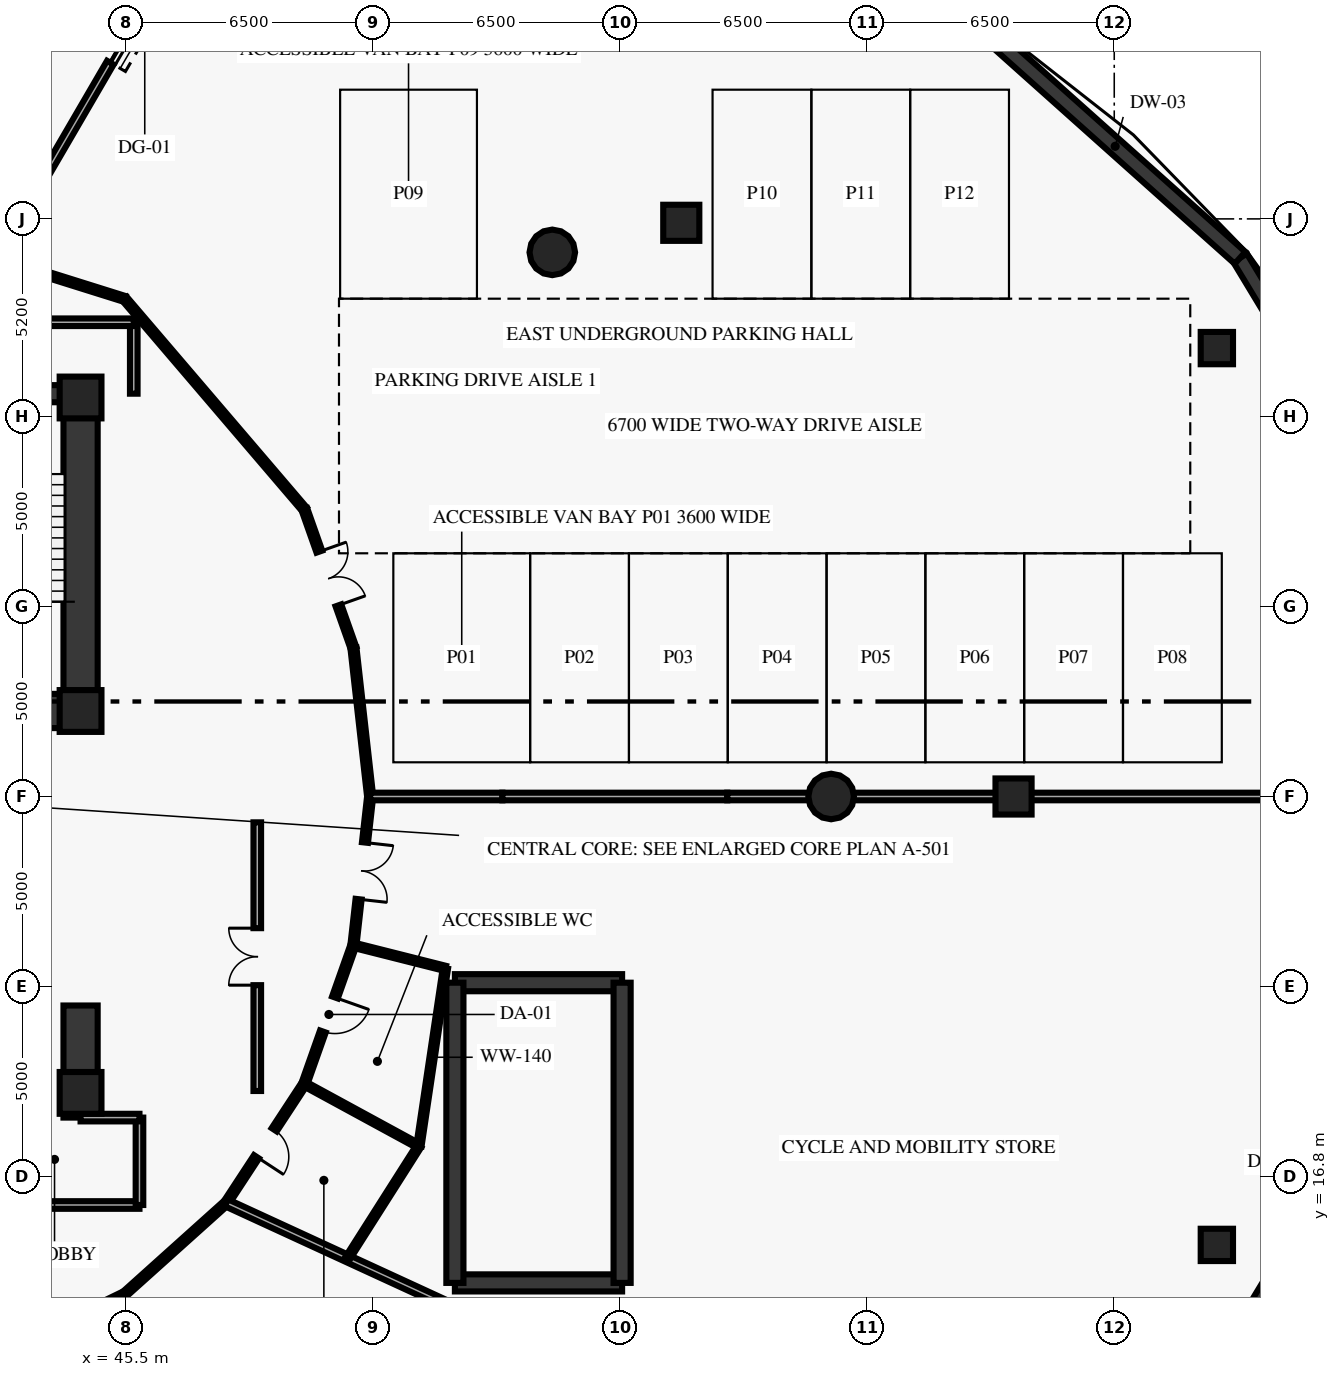
"""IFC4 building model, lengths in metres.
Left out: names, types, materials, properties, quantities, classifications, styles, units other than length and angle.
Written with IfcOpenShell. Run it as: python <this file> out.ifc"""

import sys

from ifc_helpers import new_model, si_unit, direction, frame, frame_2d, origin, origin_2d, place, context, subcontext, project, spatial, rectangle, circle, extrude, element, fill, save


model = new_model("IFC4")
c1 = context("Model", 3, precision=1e-05, world=origin(), true_north=direction((0.0, 1.0)))
c2 = subcontext(c1, "Body", "Model", "MODEL_VIEW")
j1 = project(units=[si_unit("LENGTHUNIT", "METRE"), si_unit("PLANEANGLEUNIT", "RADIAN")], contexts=[c1])
p1 = place(None, origin())
s1 = spatial("IfcSite", under=j1, at=p1, CompositionType="ELEMENT")
p2 = place(p1, origin())
s2 = spatial("IfcBuilding", under=s1, at=p2, CompositionType="ELEMENT")
p3 = place(p2, frame((0.0, 0.0, -9.0)))
s3 = spatial("IfcBuildingStorey", under=s2, at=p3, CompositionType="ELEMENT", Elevation=-9.0)
for number, where, z_axis, x_axis in (
    (1, (44.3, 19.0, 0.0), (0.0, 0.0, 1.0), (1.0, 0.0, 0.0)),
    (2, (44.3, 29.05, 0.0), (0.0, 0.0, 1.0), (1.0, 0.0, 0.0)),
    (3, (44.3, 37.3, 0.0), (0.0, 0.0, 1.0), (1.0, 0.0, 0.0)),
):
    element("IfcColumn", number, at=place(p3, frame(where, z_axis=z_axis, x_axis=x_axis)), inside=s3, PredefinedType="PILASTER", context=c2, shape_type="SweptSolid", body=[
        extrude(rectangle(XDim=1.1, YDim=1.1, at=origin_2d()), origin(), (0.0, 0.0, 1.0), 4.2),
    ])
for number, where, z_axis, x_axis in (
    (4, (64.05, 26.8, 0.0), (0.0, 0.0, 1.0), (1.0, 0.0, 0.0)),
    (5, (56.713, 41.119, 0.0), (0.0, 0.0, 1.0), (1.0, 0.0, 0.0)),
):
    element("IfcColumn", number, at=place(p3, frame(where, z_axis=z_axis, x_axis=x_axis)), inside=s3, PredefinedType="COLUMN", context=c2, shape_type="SweptSolid", body=[
        extrude(circle(Radius=0.6, at=origin_2d()), origin(), (0.0, 0.0, 1.0), 4.2),
    ])
for number, where, z_axis, x_axis in (
    (6, (68.85, 26.8, 0.0), (0.0, 0.0, 1.0), (1.0, 0.0, 0.0)),
    (7, (60.107, 41.897, 0.0), (0.0, 0.0, 1.0), (1.0, 0.0, 0.0)),
):
    element("IfcColumn", number, at=place(p3, frame(where, z_axis=z_axis, x_axis=x_axis)), inside=s3, PredefinedType="COLUMN", context=c2, shape_type="SweptSolid", body=[
        extrude(rectangle(XDim=0.95, YDim=0.95, at=origin_2d()), origin(), (0.0, 0.0, 1.0), 4.2),
    ])
for number, where, z_axis, x_axis in (
    (8, (74.2, 15.0, 0.0), (0.0, 0.0, 1.0), (1.0, 0.0, 0.0)),
    (9, (74.2, 38.6, 0.0), (0.0, 0.0, 1.0), (1.0, 0.0, 0.0)),
):
    element("IfcColumn", number, at=place(p3, frame(where, z_axis=z_axis, x_axis=x_axis)), inside=s3, PredefinedType="COLUMN", context=c2, shape_type="SweptSolid", body=[
        extrude(rectangle(XDim=0.85, YDim=0.85, at=origin_2d()), origin(), (0.0, 0.0, 1.0), 4.2),
    ])
p4 = place(p3, frame((44.3, 29.05, 0.0), z_axis=(0.0, 0.0, 1.0), x_axis=(0.0, 1.0, 0.0)))
e10 = element("IfcWall", 10, at=p4, inside=s3, PredefinedType="SHEAR", context=c2, shape_type="SweptSolid", body=[
    extrude(rectangle(XDim=8.35, YDim=0.9, at=frame_2d((4.175, 0.0))), origin(), (0.0, 0.0, 1.0), 4.2),
])
p5 = place(p3, frame((44.3, 18.35, 0.0), z_axis=(0.0, 0.0, 1.0), x_axis=(0.0, 1.0, 0.0)))
e11 = element("IfcWall", 11, at=p5, inside=s3, PredefinedType="SHEAR", context=c2, shape_type="SweptSolid", body=[
    extrude(rectangle(XDim=2.95, YDim=0.9, at=frame_2d((1.475, 0.0))), origin(), (0.0, 0.0, 1.0), 4.2),
])
p6 = place(p3, frame((33.7, 29.05, 0.0), z_axis=(0.0, 0.0, 1.0), x_axis=(1.0, 0.0, 0.0)))
e12 = element("IfcWall", 12, at=p6, inside=s3, PredefinedType="SHEAR", context=c2, shape_type="SweptSolid", body=[
    extrude(rectangle(XDim=10.6, YDim=0.9, at=frame_2d((5.3, 0.0))), origin(), (0.0, 0.0, 1.0), 4.2),
])
p7 = place(p3, frame((78.941, 34.138, 0.0), z_axis=(0.0, 0.0, 1.0), x_axis=(-0.517122636798, 0.85591131463, 0.0)))
e13 = element("IfcWall", 13, at=p7, inside=s3, PredefinedType="SHEAR", context=c2, shape_type="SweptSolid", body=[
    extrude(rectangle(XDim=7.988, YDim=0.42, at=frame_2d((3.994, 0.0))), origin(), (0.0, 0.0, 1.0), 4.2),
])
p8 = place(p3, frame((74.81, 40.975, 0.0), z_axis=(0.0, 0.0, 1.0), x_axis=(-0.745720826992, 0.666258544554, 0.0)))
e14 = element("IfcWall", 14, at=p8, inside=s3, PredefinedType="SHEAR", context=c2, shape_type="SweptSolid", body=[
    extrude(rectangle(XDim=8.812, YDim=0.42, at=frame_2d((4.406, 0.0))), origin(), (0.0, 0.0, 1.0), 4.2),
])
p9 = place(p3, frame((74.81, 12.625, 0.0), z_axis=(0.0, 0.0, 1.0), x_axis=(0.517136164524, 0.855903141332, 0.0)))
e15 = element("IfcWall", 15, at=p9, inside=s3, PredefinedType="SHEAR", context=c2, shape_type="SweptSolid", body=[
    extrude(rectangle(XDim=7.988, YDim=0.42, at=frame_2d((3.994, 0.0))), origin(), (0.0, 0.0, 1.0), 4.2),
])
p10 = place(p3, frame((44.3, 37.4, 0.0), z_axis=(0.0, 0.0, 1.0), x_axis=(-1.0, 0.0, 0.0)))
e16 = element("IfcWall", 16, at=p10, inside=s3, PredefinedType="SHEAR", context=c2, shape_type="SweptSolid", body=[
    extrude(rectangle(XDim=3.65, YDim=0.45, at=frame_2d((1.825, 0.0))), origin(), (0.0, 0.0, 1.0), 4.2),
])
p11 = place(p10, frame((1.25, 0.0, 0.0)))
e17 = element("IfcOpeningElement", 17, at=p11, cuts=e16, PredefinedType="OPENING", context=c2, shape_type="SweptSolid", body=[
    extrude(rectangle(XDim=1.15, YDim=2.15, at=frame_2d((0.575, 1.075))), frame((0.0, 0.235, 0.0), z_axis=(0.0, -1.0, 0.0), x_axis=(1.0, 0.0, 0.0)), (0.0, 0.0, 1.0), 0.47),
])
for number, where, z_axis, x_axis in (
    (18, (54.15, 14.0, 0.0), (0.0, 0.0, 1.0), (1.0, 0.0, 0.0)),
    (19, (54.15, 21.9, 0.0), (0.0, 0.0, 1.0), (1.0, 0.0, 0.0)),
):
    element("IfcWall", number, at=place(p3, frame(where, z_axis=z_axis, x_axis=x_axis)), inside=s3, PredefinedType="SHEAR", context=c2, shape_type="SweptSolid", body=[
        extrude(rectangle(XDim=4.4, YDim=0.45, at=frame_2d((2.2, 0.0))), origin(), (0.0, 0.0, 1.0), 4.2),
    ])
for number, where, z_axis, x_axis in (
    (20, (54.15, 14.0, 0.0), (0.0, 0.0, 1.0), (0.0, 1.0, 0.0)),
    (21, (58.55, 14.0, 0.0), (0.0, 0.0, 1.0), (0.0, 1.0, 0.0)),
):
    element("IfcWall", number, at=place(p3, frame(where, z_axis=z_axis, x_axis=x_axis)), inside=s3, PredefinedType="SHEAR", context=c2, shape_type="SweptSolid", body=[
        extrude(rectangle(XDim=7.9, YDim=0.45, at=frame_2d((3.95, 0.0))), origin(), (0.0, 0.0, 1.0), 4.2),
    ])
p12 = place(p3, frame((45.7, 37.4, 0.0), z_axis=(0.0, 0.0, 1.0), x_axis=(0.0, 1.0, 0.0)))
e22 = element("IfcWall", 22, at=p12, inside=s3, PredefinedType="SOLIDWALL", context=c2, shape_type="SweptSolid", body=[
    extrude(rectangle(XDim=1.88, YDim=0.2, at=frame_2d((0.94, 0.0))), origin(), (0.0, 0.0, 1.0), 4.2),
])
p13 = place(p3, frame((45.7, 39.28, 0.0), z_axis=(0.0, 0.0, 1.0), x_axis=(-1.0, 0.0, 0.0)))
e23 = element("IfcWall", 23, at=p13, inside=s3, PredefinedType="SOLIDWALL", context=c2, shape_type="SweptSolid", body=[
    extrude(rectangle(XDim=6.6, YDim=0.2, at=frame_2d((3.3, 0.0))), origin(), (0.0, 0.0, 1.0), 4.2),
])
p14 = place(p13, frame((4.35, 0.0, 0.0)))
e24 = element("IfcOpeningElement", 24, at=p14, cuts=e23, PredefinedType="OPENING", context=c2, shape_type="SweptSolid", body=[
    extrude(rectangle(XDim=1.6, YDim=2.2, at=frame_2d((0.8, 1.1))), frame((0.0, 0.11, 0.0), z_axis=(0.0, -1.0, 0.0), x_axis=(1.0, 0.0, 0.0)), (0.0, 0.0, 1.0), 0.22),
])
p15 = place(p3, frame((48.95, 19.05, 0.0), z_axis=(0.0, 0.0, 1.0), x_axis=(0.0, 1.0, 0.0)))
e25 = element("IfcWall", 25, at=p15, inside=s3, PredefinedType="SOLIDWALL", context=c2, shape_type="SweptSolid", body=[
    extrude(rectangle(XDim=7.07, YDim=0.2, at=frame_2d((3.535, 0.0))), origin(), (0.0, 0.0, 1.0), 4.2),
])
p16 = place(p15, frame((2.785, 0.0, 0.0)))
e26 = element("IfcOpeningElement", 26, at=p16, cuts=e25, PredefinedType="OPENING", context=c2, shape_type="SweptSolid", body=[
    extrude(rectangle(XDim=1.5, YDim=2.2, at=frame_2d((0.75, 1.1))), frame((0.0, 0.11, 0.0), z_axis=(0.0, -1.0, 0.0), x_axis=(1.0, 0.0, 0.0)), (0.0, 0.0, 1.0), 0.22),
])
p17 = place(p3, frame((41.35, 16.05, 0.0), z_axis=(0.0, 0.0, 1.0), x_axis=(1.0, 0.0, 0.0)))
e27 = element("IfcWall", 27, at=p17, inside=s3, PredefinedType="SOLIDWALL", context=c2, shape_type="SweptSolid", body=[
    extrude(rectangle(XDim=4.5, YDim=0.2, at=frame_2d((2.25, 0.0))), origin(), (0.0, 0.0, 1.0), 4.2),
])
p18 = place(p3, frame((45.85, 16.05, 0.0), z_axis=(0.0, 0.0, 1.0), x_axis=(0.0, 1.0, 0.0)))
e28 = element("IfcWall", 28, at=p18, inside=s3, PredefinedType="SOLIDWALL", context=c2, shape_type="SweptSolid", body=[
    extrude(rectangle(XDim=2.3, YDim=0.2, at=frame_2d((1.15, 0.0))), origin(), (0.0, 0.0, 1.0), 4.2),
])
p19 = place(p3, frame((44.3, 18.35, 0.0), z_axis=(0.0, 0.0, 1.0), x_axis=(1.0, 0.0, 0.0)))
e29 = element("IfcWall", 29, at=p19, inside=s3, PredefinedType="SOLIDWALL", context=c2, shape_type="SweptSolid", body=[
    extrude(rectangle(XDim=1.55, YDim=0.2, at=frame_2d((0.775, 0.0))), origin(), (0.0, 0.0, 1.0), 4.2),
])
p20 = place(p3, frame((51.92, 26.8, 0.0), z_axis=(0.0, 0.0, 1.0), x_axis=(-0.111731247657, 0.993738460711, 0.0)))
e30 = element("IfcWall", 30, at=p20, inside=s3, PredefinedType="PARTITIONING", context=c2, shape_type="SweptSolid", body=[
    extrude(rectangle(XDim=3.938, YDim=0.16, at=frame_2d((1.969, 0.0))), origin(), (0.0, 0.0, 1.0), 4.2),
])
p21 = place(p3, frame((50.189, 34.36, 0.0), z_axis=(0.0, 0.0, 1.0), x_axis=(0.333684770033, -0.942684716248, 0.0)))
e31 = element("IfcWall", 31, at=p21, inside=s3, PredefinedType="PARTITIONING", context=c2, shape_type="SweptSolid", body=[
    extrude(rectangle(XDim=3.869, YDim=0.16, at=frame_2d((1.935, 0.0))), origin(), (0.0, 0.0, 1.0), 4.2),
])
p22 = place(p21, frame((1.184, 0.0, 0.0)))
e32 = element("IfcOpeningElement", 32, at=p22, cuts=e31, PredefinedType="OPENING", context=c2, shape_type="SweptSolid", body=[
    extrude(rectangle(XDim=1.5, YDim=2.2, at=frame_2d((0.75, 1.1))), frame((0.0, 0.09, 0.0), z_axis=(0.0, -1.0, 0.0), x_axis=(1.0, 0.0, 0.0)), (0.0, 0.0, 1.0), 0.18),
])
p23 = place(p3, frame((50.189, 34.36, 0.0), z_axis=(0.0, 0.0, 1.0), x_axis=(-0.649652680018, 0.760231145998, 0.0)))
e33 = element("IfcWall", 33, at=p23, inside=s3, PredefinedType="PARTITIONING", context=c2, shape_type="SweptSolid", body=[
    extrude(rectangle(XDim=7.279, YDim=0.16, at=frame_2d((3.64, 0.0))), origin(), (0.0, 0.0, 1.0), 4.2),
])
p24 = place(p3, frame((45.46, 39.894, 0.0), z_axis=(0.0, 0.0, 1.0), x_axis=(-0.95417919824, 0.29923578938, 0.0)))
e34 = element("IfcWall", 34, at=p24, inside=s3, PredefinedType="PARTITIONING", context=c2, shape_type="SweptSolid", body=[
    extrude(rectangle(XDim=6.77, YDim=0.16, at=frame_2d((3.385, 0.0))), origin(), (0.0, 0.0, 1.0), 4.2),
])
p25 = place(p3, frame((45.46, 13.706, 0.0), z_axis=(0.0, 0.0, 1.0), x_axis=(-0.899789784655, -0.436323668199, 0.0)))
e35 = element("IfcWall", 35, at=p25, inside=s3, PredefinedType="PARTITIONING", context=c2, shape_type="SweptSolid", body=[
    extrude(rectangle(XDim=3.463, YDim=0.16, at=frame_2d((1.731, 0.0))), origin(), (0.0, 0.0, 1.0), 4.2),
])
p26 = place(p25, frame((0.982, 0.0, 0.0)))
e36 = element("IfcOpeningElement", 36, at=p26, cuts=e35, PredefinedType="OPENING", context=c2, shape_type="SweptSolid", body=[
    extrude(rectangle(XDim=1.5, YDim=2.2, at=frame_2d((0.75, 1.1))), frame((0.0, 0.09, 0.0), z_axis=(0.0, -1.0, 0.0), x_axis=(1.0, 0.0, 0.0)), (0.0, 0.0, 1.0), 0.18),
])
p27 = place(p3, frame((45.46, 13.706, 0.0), z_axis=(0.0, 0.0, 1.0), x_axis=(0.744066617248, 0.668105432621, 0.0)))
e37 = element("IfcWall", 37, at=p27, inside=s3, PredefinedType="PARTITIONING", context=c2, shape_type="SweptSolid", body=[
    extrude(rectangle(XDim=3.596, YDim=0.16, at=frame_2d((1.798, 0.0))), origin(), (0.0, 0.0, 1.0), 4.2),
])
p28 = place(p3, frame((50.189, 19.24, 0.0), z_axis=(0.0, 0.0, 1.0), x_axis=(-0.548318837904, -0.836269365694, 0.0)))
e38 = element("IfcWall", 38, at=p28, inside=s3, PredefinedType="PARTITIONING", context=c2, shape_type="SweptSolid", body=[
    extrude(rectangle(XDim=3.744, YDim=0.16, at=frame_2d((1.872, 0.0))), origin(), (0.0, 0.0, 1.0), 4.2),
])
p29 = place(p28, frame((1.447, 0.0, 0.0)))
e39 = element("IfcOpeningElement", 39, at=p29, cuts=e38, PredefinedType="OPENING", context=c2, shape_type="SweptSolid", body=[
    extrude(rectangle(XDim=0.85, YDim=2.1, at=frame_2d((0.425, 1.05))), frame((0.0, 0.09, 0.0), z_axis=(0.0, -1.0, 0.0), x_axis=(1.0, 0.0, 0.0)), (0.0, 0.0, 1.0), 0.18),
])
p30 = place(p3, frame((51.48, 22.887, 0.0), z_axis=(0.0, 0.0, 1.0), x_axis=(-0.333704620558, -0.942677689467, 0.0)))
e40 = element("IfcWall", 40, at=p30, inside=s3, PredefinedType="PARTITIONING", context=c2, shape_type="SweptSolid", body=[
    extrude(rectangle(XDim=3.869, YDim=0.16, at=frame_2d((1.934, 0.0))), origin(), (0.0, 0.0, 1.0), 4.2),
])
p31 = place(p30, frame((1.459, 0.0, 0.0)))
e41 = element("IfcOpeningElement", 41, at=p31, cuts=e40, PredefinedType="OPENING", context=c2, shape_type="SweptSolid", body=[
    extrude(rectangle(XDim=0.95, YDim=2.1, at=frame_2d((0.475, 1.05))), frame((0.0, 0.09, 0.0), z_axis=(0.0, -1.0, 0.0), x_axis=(1.0, 0.0, 0.0)), (0.0, 0.0, 1.0), 0.18),
])
p32 = place(p3, frame((51.92, 26.8, 0.0), z_axis=(0.0, 0.0, 1.0), x_axis=(-0.111724363671, -0.99373923469, 0.0)))
e42 = element("IfcWall", 42, at=p32, inside=s3, PredefinedType="PARTITIONING", context=c2, shape_type="SweptSolid", body=[
    extrude(rectangle(XDim=3.938, YDim=0.16, at=frame_2d((1.969, 0.0))), origin(), (0.0, 0.0, 1.0), 4.2),
])
p33 = place(p32, frame((1.219, 0.0, 0.0)))
e43 = element("IfcOpeningElement", 43, at=p33, cuts=e42, PredefinedType="OPENING", context=c2, shape_type="SweptSolid", body=[
    extrude(rectangle(XDim=1.5, YDim=2.2, at=frame_2d((0.75, 1.1))), frame((0.0, 0.09, 0.0), z_axis=(0.0, -1.0, 0.0), x_axis=(1.0, 0.0, 0.0)), (0.0, 0.0, 1.0), 0.18),
])
p34 = place(p3, frame((51.92, 26.8, 0.0), z_axis=(0.0, 0.0, 1.0), x_axis=(1.0, 0.0, 0.0)))
e44 = element("IfcWall", 44, at=p34, inside=s3, PredefinedType="SOLIDWALL", context=c2, shape_type="SweptSolid", body=[
    extrude(rectangle(XDim=3.48, YDim=0.2, at=frame_2d((1.74, 0.0))), origin(), (0.0, 0.0, 1.0), 4.2),
])
p35 = place(p3, frame((55.4, 26.8, 0.0), z_axis=(0.0, 0.0, 1.0), x_axis=(1.0, 0.0, 0.0)))
e45 = element("IfcWall", 45, at=p35, inside=s3, PredefinedType="SOLIDWALL", context=c2, shape_type="SweptSolid", body=[
    extrude(rectangle(XDim=5.917, YDim=0.2, at=frame_2d((2.958, 0.0))), origin(), (0.0, 0.0, 1.0), 4.2),
])
p36 = place(p3, frame((61.317, 26.8, 0.0), z_axis=(0.0, 0.0, 1.0), x_axis=(1.0, 0.0, 0.0)))
e46 = element("IfcWall", 46, at=p36, inside=s3, PredefinedType="SOLIDWALL", context=c2, shape_type="SweptSolid", body=[
    extrude(rectangle(XDim=7.533, YDim=0.2, at=frame_2d((3.767, 0.0))), origin(), (0.0, 0.0, 1.0), 3.16),
])
p37 = place(p3, frame((68.85, 26.8, 0.0), z_axis=(0.0, 0.0, 1.0), x_axis=(1.0, 0.0, 0.0)))
e47 = element("IfcWall", 47, at=p37, inside=s3, PredefinedType="SOLIDWALL", context=c2, shape_type="SweptSolid", body=[
    extrude(rectangle(XDim=11.235, YDim=0.2, at=frame_2d((5.617, 0.0))), origin(), (0.0, 0.0, 1.0), 4.2),
])
p38 = place(p3, frame((42.344, 41.405, 0.0), z_axis=(0.0, 0.0, 1.0), x_axis=(0.503097710949, 0.864229537355, 0.0)))
e48 = element("IfcWall", 48, at=p38, inside=s3, PredefinedType="SOLIDWALL", context=c2, shape_type="SweptSolid", body=[
    extrude(rectangle(XDim=14.49, YDim=0.2, at=frame_2d((7.245, 0.0))), origin(), (0.0, 0.0, 1.0), 4.2),
])
p39 = place(p38, frame((5.445, 0.0, 0.0)))
e49 = element("IfcOpeningElement", 49, at=p39, cuts=e48, PredefinedType="OPENING", context=c2, shape_type="SweptSolid", body=[
    extrude(rectangle(XDim=3.6, YDim=2.4, at=frame_2d((1.8, 1.2))), frame((0.0, 0.11, 0.0), z_axis=(0.0, -1.0, 0.0), x_axis=(1.0, 0.0, 0.0)), (0.0, 0.0, 1.0), 0.22),
])
p40 = place(p3, frame((48.136, 16.109, 0.0), z_axis=(0.0, 0.0, 1.0), x_axis=(0.908368089602, -0.418171512411, 0.0)))
e50 = element("IfcWall", 50, at=p40, inside=s3, PredefinedType="SOLIDWALL", context=c2, shape_type="SweptSolid", body=[
    extrude(rectangle(XDim=12.26, YDim=0.2, at=frame_2d((6.13, 0.0))), origin(), (0.0, 0.0, 1.0), 4.2),
])
p41 = place(p3, frame((50.189, 19.24, 0.0), z_axis=(0.0, 0.0, 1.0), x_axis=(0.878392721738, -0.477939563541, 0.0)))
e51 = element("IfcWall", 51, at=p41, inside=s3, PredefinedType="PARTITIONING", context=c2, shape_type="SweptSolid", body=[
    extrude(rectangle(XDim=3.431, YDim=0.14, at=frame_2d((1.716, 0.0))), origin(), (0.0, 0.0, 1.0), 4.2),
])
p42 = place(p3, frame((51.48, 22.887, 0.0), z_axis=(0.0, 0.0, 1.0), x_axis=(0.969564374521, -0.244836524357, 0.0)))
e52 = element("IfcWall", 52, at=p42, inside=s3, PredefinedType="PARTITIONING", context=c2, shape_type="SweptSolid", body=[
    extrude(rectangle(XDim=2.496, YDim=0.14, at=frame_2d((1.248, 0.0))), origin(), (0.0, 0.0, 1.0), 4.2),
])
p43 = place(p3, frame((51.322, 14.642, 0.0), z_axis=(0.0, 0.0, 1.0), x_axis=(0.53656900511, 0.84385644677, 0.0)))
e53 = element("IfcWall", 53, at=p43, inside=s3, PredefinedType="PARTITIONING", context=c2, shape_type="SweptSolid", body=[
    extrude(rectangle(XDim=3.505, YDim=0.14, at=frame_2d((1.753, 0.0))), origin(), (0.0, 0.0, 1.0), 4.2),
])
p44 = place(p3, frame((53.203, 17.6, 0.0), z_axis=(0.0, 0.0, 1.0), x_axis=(0.147441370436, 0.989070797407, 0.0)))
e54 = element("IfcWall", 54, at=p44, inside=s3, PredefinedType="PARTITIONING", context=c2, shape_type="SweptSolid", body=[
    extrude(rectangle(XDim=4.728, YDim=0.14, at=frame_2d((2.364, 0.0))), origin(), (0.0, 0.0, 1.0), 4.2),
])
p45 = place(p16, origin())
e55 = element("IfcDoor", 55, at=p45, inside=s3, OperationType="DOUBLE_DOOR_SINGLE_SWING", PredefinedType="DOOR", context=c2, shape_type="SweptSolid", body=[
    extrude(rectangle(XDim=1.5, YDim=2.2, at=frame_2d((0.75, 1.1))), frame((0.0, 0.025, 0.0), z_axis=(0.0, -1.0, 0.0), x_axis=(1.0, 0.0, 0.0)), (0.0, 0.0, 1.0), 0.05),
])
fill(e26, e55)
p46 = place(p22, origin())
e56 = element("IfcDoor", 56, at=p46, inside=s3, OperationType="DOUBLE_DOOR_SINGLE_SWING", PredefinedType="DOOR", context=c2, shape_type="SweptSolid", body=[
    extrude(rectangle(XDim=1.5, YDim=2.2, at=frame_2d((0.75, 1.1))), frame((0.0, 0.025, 0.0), z_axis=(0.0, -1.0, 0.0), x_axis=(1.0, 0.0, 0.0)), (0.0, 0.0, 1.0), 0.05),
])
fill(e32, e56)
p47 = place(p29, origin())
e57 = element("IfcDoor", 57, at=p47, inside=s3, OperationType="SINGLE_SWING_RIGHT", PredefinedType="DOOR", context=c2, shape_type="SweptSolid", body=[
    extrude(rectangle(XDim=0.85, YDim=2.1, at=frame_2d((0.425, 1.05))), frame((0.0, 0.025, 0.0), z_axis=(0.0, -1.0, 0.0), x_axis=(1.0, 0.0, 0.0)), (0.0, 0.0, 1.0), 0.05),
])
fill(e39, e57)
p48 = place(p31, origin())
e58 = element("IfcDoor", 58, at=p48, inside=s3, OperationType="SINGLE_SWING_LEFT", PredefinedType="DOOR", context=c2, shape_type="SweptSolid", body=[
    extrude(rectangle(XDim=0.95, YDim=2.1, at=frame_2d((0.475, 1.05))), frame((0.0, 0.025, 0.0), z_axis=(0.0, -1.0, 0.0), x_axis=(1.0, 0.0, 0.0)), (0.0, 0.0, 1.0), 0.05),
])
fill(e41, e58)
p49 = place(p33, origin())
e59 = element("IfcDoor", 59, at=p49, inside=s3, OperationType="DOUBLE_DOOR_SINGLE_SWING", PredefinedType="DOOR", context=c2, shape_type="SweptSolid", body=[
    extrude(rectangle(XDim=1.5, YDim=2.2, at=frame_2d((0.75, 1.1))), frame((0.0, 0.025, 0.0), z_axis=(0.0, -1.0, 0.0), x_axis=(1.0, 0.0, 0.0)), (0.0, 0.0, 1.0), 0.05),
])
fill(e43, e59)
p50 = place(p39, origin())
e60 = element("IfcDoor", 60, at=p50, inside=s3, OperationType="ROLLINGUP", PredefinedType="GATE", context=c2, shape_type="SweptSolid", body=[
    extrude(rectangle(XDim=3.6, YDim=2.4, at=frame_2d((1.8, 1.2))), frame((0.0, 0.025, 0.0), z_axis=(0.0, -1.0, 0.0), x_axis=(1.0, 0.0, 0.0)), (0.0, 0.0, 1.0), 0.05),
])
fill(e49, e60)
save(model, sys.argv[1])
